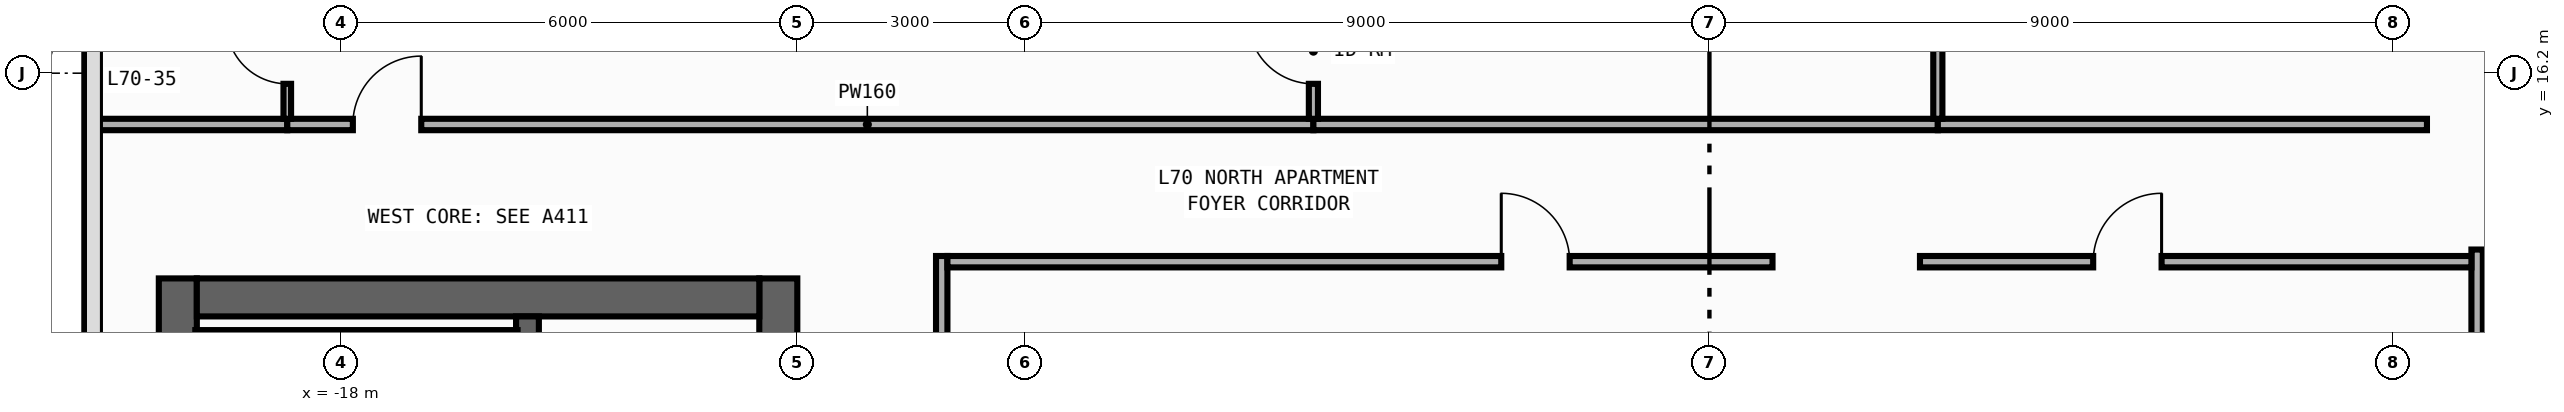
"""IFC4 building model, lengths in metres.
Left out: names, types, materials, properties, quantities, classifications, styles, units other than length and angle.
Written with IfcOpenShell. Run it as: python <this file> out.ifc"""

import sys

from ifc_helpers import new_model, si_unit, direction, frame, frame_2d, origin, place, context, subcontext, project, spatial, rectangle, extrude, element, fill, save


model = new_model("IFC4")
c1 = context("Model", 3, precision=1e-05, world=origin(), true_north=direction((0.0, 1.0)))
c2 = subcontext(c1, "Body", "Model", "MODEL_VIEW")
j1 = project(units=[si_unit("LENGTHUNIT", "METRE"), si_unit("PLANEANGLEUNIT", "RADIAN")], contexts=[c1])
p1 = place(None, origin())
s1 = spatial("IfcSite", under=j1, at=p1, CompositionType="ELEMENT")
p2 = place(p1, origin())
s2 = spatial("IfcBuilding", under=s1, at=p2, CompositionType="ELEMENT")
p3 = place(p2, frame((0.0, 0.0, 292.8)))
s3 = spatial("IfcBuildingStorey", under=s2, at=p3, CompositionType="ELEMENT", Elevation=292.8)
p4 = place(p3, frame((-20.15, -13.5, 0.0), z_axis=(0.0, 0.0, 1.0), x_axis=(0.0, 1.0, 0.0)))
e1 = element("IfcWall", 1, at=p4, inside=s3, PredefinedType="SHEAR", context=c2, shape_type="SweptSolid", body=[
    extrude(rectangle(XDim=27.0, YDim=0.5, at=frame_2d((13.5, 0.0))), origin(), (0.0, 0.0, 1.0), 3.54),
])
p5 = place(p3, frame((-12.25, -13.5, 0.0), z_axis=(0.0, 0.0, 1.0), x_axis=(0.0, 1.0, 0.0)))
e2 = element("IfcWall", 2, at=p5, inside=s3, PredefinedType="SHEAR", context=c2, shape_type="SweptSolid", body=[
    extrude(rectangle(XDim=27.0, YDim=0.5, at=frame_2d((13.5, 0.0))), origin(), (0.0, 0.0, 1.0), 3.54),
])
p6 = place(p5, frame((15.175, 0.0, 0.0)))
e3 = element("IfcOpeningElement", 3, at=p6, cuts=e2, PredefinedType="OPENING", context=c2, shape_type="SweptSolid", body=[
    extrude(rectangle(XDim=0.85, YDim=2.1, at=frame_2d((0.425, 1.05))), frame((0.0, 0.26, 0.0), z_axis=(0.0, -1.0, 0.0), x_axis=(1.0, 0.0, 0.0)), (0.0, 0.0, 1.0), 0.52),
])
p7 = place(p5, frame((21.275, 0.0, 0.0)))
e4 = element("IfcOpeningElement", 4, at=p7, cuts=e2, PredefinedType="OPENING", context=c2, shape_type="SweptSolid", body=[
    extrude(rectangle(XDim=0.85, YDim=2.1, at=frame_2d((0.425, 1.05))), frame((0.0, 0.26, 0.0), z_axis=(0.0, -1.0, 0.0), x_axis=(1.0, 0.0, 0.0)), (0.0, 0.0, 1.0), 0.52),
])
p8 = place(p5, frame((4.275, 0.0, 0.0)))
e5 = element("IfcOpeningElement", 5, at=p8, cuts=e2, PredefinedType="OPENING", context=c2, shape_type="SweptSolid", body=[
    extrude(rectangle(XDim=0.85, YDim=2.1, at=frame_2d((0.425, 1.05))), frame((0.0, 0.26, 0.0), z_axis=(0.0, -1.0, 0.0), x_axis=(1.0, 0.0, 0.0)), (0.0, 0.0, 1.0), 0.52),
])
p9 = place(p5, frame((10.275, 0.0, 0.0)))
e6 = element("IfcOpeningElement", 6, at=p9, cuts=e2, PredefinedType="OPENING", context=c2, shape_type="SweptSolid", body=[
    extrude(rectangle(XDim=0.85, YDim=2.1, at=frame_2d((0.425, 1.05))), frame((0.0, 0.26, 0.0), z_axis=(0.0, -1.0, 0.0), x_axis=(1.0, 0.0, 0.0)), (0.0, 0.0, 1.0), 0.52),
])
p10 = place(p5, frame((12.725, 0.0, 0.0)))
e7 = element("IfcOpeningElement", 7, at=p10, cuts=e2, PredefinedType="OPENING", context=c2, shape_type="SweptSolid", body=[
    extrude(rectangle(XDim=1.15, YDim=2.2, at=frame_2d((0.575, 1.1))), frame((0.0, 0.26, 0.0), z_axis=(0.0, -1.0, 0.0), x_axis=(1.0, 0.0, 0.0)), (0.0, 0.0, 1.0), 0.52),
])
p11 = place(p5, frame((1.625, 0.0, 0.0)))
e8 = element("IfcOpeningElement", 8, at=p11, cuts=e2, PredefinedType="OPENING", context=c2, shape_type="SweptSolid", body=[
    extrude(rectangle(XDim=0.85, YDim=2.1, at=frame_2d((0.425, 1.05))), frame((0.0, 0.26, 0.0), z_axis=(0.0, -1.0, 0.0), x_axis=(1.0, 0.0, 0.0)), (0.0, 0.0, 1.0), 0.52),
])
p12 = place(p3, frame((-19.9, 13.25, 0.0), z_axis=(0.0, 0.0, 1.0), x_axis=(1.0, 0.0, 0.0)))
e9 = element("IfcWall", 9, at=p12, inside=s3, PredefinedType="SHEAR", context=c2, shape_type="SweptSolid", body=[
    extrude(rectangle(XDim=7.4, YDim=0.5, at=frame_2d((3.7, 0.0))), origin(), (0.0, 0.0, 1.0), 3.54),
])
p13 = place(p3, frame((-15.55, -13.0, 0.0), z_axis=(0.0, 0.0, 1.0), x_axis=(0.0, 1.0, 0.0)))
e10 = element("IfcWall", 10, at=p13, inside=s3, PredefinedType="SHEAR", context=c2, shape_type="SweptSolid", body=[
    extrude(rectangle(XDim=26.0, YDim=0.3, at=frame_2d((13.0, 0.0))), origin(), (0.0, 0.0, 1.0), 3.54),
])
p14 = place(p13, frame((12.225, 0.0, 0.0)))
e11 = element("IfcOpeningElement", 11, at=p14, cuts=e10, PredefinedType="OPENING", context=c2, shape_type="SweptSolid", body=[
    extrude(rectangle(XDim=1.15, YDim=2.2, at=frame_2d((0.575, 1.1))), frame((0.0, 0.16, 0.0), z_axis=(0.0, -1.0, 0.0), x_axis=(1.0, 0.0, 0.0)), (0.0, 0.0, 1.0), 0.32),
])
p15 = place(p13, frame((1.125, 0.0, 0.0)))
e12 = element("IfcOpeningElement", 12, at=p15, cuts=e10, PredefinedType="OPENING", context=c2, shape_type="SweptSolid", body=[
    extrude(rectangle(XDim=0.85, YDim=2.1, at=frame_2d((0.425, 1.05))), frame((0.0, 0.16, 0.0), z_axis=(0.0, -1.0, 0.0), x_axis=(1.0, 0.0, 0.0)), (0.0, 0.0, 1.0), 0.32),
])
p16 = place(p3, frame((-19.92, 12.71, 0.0), z_axis=(0.0, 0.0, 1.0), x_axis=(1.0, 0.0, 0.0)))
e13 = element("IfcWall", 13, at=p16, inside=s3, PredefinedType="SHEAR", context=c2, shape_type="SweptSolid", body=[
    extrude(rectangle(XDim=4.24, YDim=0.22, at=frame_2d((2.12, 0.0))), origin(), (0.0, 0.0, 1.0), 3.54),
])
p17 = place(p3, frame((-10.1, 2.39, 0.0), z_axis=(0.0, 0.0, 1.0), x_axis=(0.0, 1.0, 0.0)))
e14 = element("IfcWall", 14, at=p17, inside=s3, PredefinedType="PARTITIONING", context=c2, shape_type="SweptSolid", body=[
    extrude(rectangle(XDim=11.405, YDim=0.15, at=frame_2d((5.703, 0.0))), origin(), (0.0, 0.0, 1.0), 3.54),
])
p18 = place(p17, frame((2.5, 0.0, 0.0)))
e15 = element("IfcOpeningElement", 15, at=p18, cuts=e14, PredefinedType="OPENING", context=c2, shape_type="SweptSolid", body=[
    extrude(rectangle(XDim=0.9, YDim=2.15, at=frame_2d((0.45, 1.075))), frame((0.0, 0.085, 0.0), z_axis=(0.0, -1.0, 0.0), x_axis=(1.0, 0.0, 0.0)), (0.0, 0.0, 1.0), 0.17),
])
p19 = place(p3, frame((10.1, 2.39, 0.0), z_axis=(0.0, 0.0, 1.0), x_axis=(0.0, 1.0, 0.0)))
e16 = element("IfcWall", 16, at=p19, inside=s3, PredefinedType="PARTITIONING", context=c2, shape_type="SweptSolid", body=[
    extrude(rectangle(XDim=11.49, YDim=0.15, at=frame_2d((5.745, 0.0))), origin(), (0.0, 0.0, 1.0), 3.54),
])
p20 = place(p19, frame((2.475, 0.0, 0.0)))
e17 = element("IfcOpeningElement", 17, at=p20, cuts=e16, PredefinedType="OPENING", context=c2, shape_type="SweptSolid", body=[
    extrude(rectangle(XDim=0.9, YDim=2.15, at=frame_2d((0.45, 1.075))), frame((0.0, 0.085, 0.0), z_axis=(0.0, -1.0, 0.0), x_axis=(1.0, 0.0, 0.0)), (0.0, 0.0, 1.0), 0.17),
])
p21 = place(p3, frame((-21.255, 15.525, 0.0), z_axis=(0.0, 0.0, 1.0), x_axis=(1.0, 0.0, 0.0)))
e18 = element("IfcWall", 18, at=p21, inside=s3, PredefinedType="PARTITIONING", context=c2, shape_type="SweptSolid", body=[
    extrude(rectangle(XDim=2.545, YDim=0.15, at=frame_2d((1.272, 0.0))), origin(), (0.0, 0.0, 1.0), 3.54),
])
p22 = place(p3, frame((-18.71, 15.525, 0.0), z_axis=(0.0, 0.0, 1.0), x_axis=(1.0, 0.0, 0.0)))
e19 = element("IfcWall", 19, at=p22, inside=s3, PredefinedType="PARTITIONING", context=c2, shape_type="SweptSolid", body=[
    extrude(rectangle(XDim=13.5, YDim=0.15, at=frame_2d((6.75, 0.0))), origin(), (0.0, 0.0, 1.0), 3.54),
])
p23 = place(p22, frame((0.863, 0.0, 0.0)))
e20 = element("IfcOpeningElement", 20, at=p23, cuts=e19, PredefinedType="OPENING", context=c2, shape_type="SweptSolid", body=[
    extrude(rectangle(XDim=0.9, YDim=2.15, at=frame_2d((0.45, 1.075))), frame((0.0, 0.085, 0.0), z_axis=(0.0, -1.0, 0.0), x_axis=(1.0, 0.0, 0.0)), (0.0, 0.0, 1.0), 0.17),
])
p24 = place(p3, frame((-5.21, 15.525, 0.0), z_axis=(0.0, 0.0, 1.0), x_axis=(1.0, 0.0, 0.0)))
e21 = element("IfcWall", 21, at=p24, inside=s3, PredefinedType="PARTITIONING", context=c2, shape_type="SweptSolid", body=[
    extrude(rectangle(XDim=8.215, YDim=0.15, at=frame_2d((4.107, 0.0))), origin(), (0.0, 0.0, 1.0), 3.54),
])
p25 = place(p3, frame((3.005, 15.525, 0.0), z_axis=(0.0, 0.0, 1.0), x_axis=(1.0, 0.0, 0.0)))
e22 = element("IfcWall", 22, at=p25, inside=s3, PredefinedType="PARTITIONING", context=c2, shape_type="SweptSolid", body=[
    extrude(rectangle(XDim=6.435, YDim=0.15, at=frame_2d((3.218, 0.0))), origin(), (0.0, 0.0, 1.0), 3.54),
])
p26 = place(p3, frame((-10.025, 13.72, 0.0), z_axis=(0.0, 0.0, 1.0), x_axis=(1.0, 0.0, 0.0)))
e23 = element("IfcWall", 23, at=p26, inside=s3, PredefinedType="PARTITIONING", context=c2, shape_type="SweptSolid", body=[
    extrude(rectangle(XDim=10.855, YDim=0.15, at=frame_2d((5.427, 0.0))), origin(), (0.0, 0.0, 1.0), 3.54),
])
p27 = place(p26, frame((7.286, 0.0, 0.0)))
e24 = element("IfcOpeningElement", 24, at=p27, cuts=e23, PredefinedType="OPENING", context=c2, shape_type="SweptSolid", body=[
    extrude(rectangle(XDim=0.9, YDim=2.15, at=frame_2d((0.45, 1.075))), frame((0.0, 0.085, 0.0), z_axis=(0.0, -1.0, 0.0), x_axis=(1.0, 0.0, 0.0)), (0.0, 0.0, 1.0), 0.17),
])
p28 = place(p3, frame((2.77, 13.72, 0.0), z_axis=(0.0, 0.0, 1.0), x_axis=(1.0, 0.0, 0.0)))
e25 = element("IfcWall", 25, at=p28, inside=s3, PredefinedType="PARTITIONING", context=c2, shape_type="SweptSolid", body=[
    extrude(rectangle(XDim=7.255, YDim=0.15, at=frame_2d((3.627, 0.0))), origin(), (0.0, 0.0, 1.0), 3.54),
])
p29 = place(p28, frame((2.279, 0.0, 0.0)))
e26 = element("IfcOpeningElement", 26, at=p29, cuts=e25, PredefinedType="OPENING", context=c2, shape_type="SweptSolid", body=[
    extrude(rectangle(XDim=0.9, YDim=2.15, at=frame_2d((0.45, 1.075))), frame((0.0, 0.085, 0.0), z_axis=(0.0, -1.0, 0.0), x_axis=(1.0, 0.0, 0.0)), (0.0, 0.0, 1.0), 0.17),
])
p30 = place(p3, frame((-18.71, 15.6, 0.0), z_axis=(0.0, 0.0, 1.0), x_axis=(0.0, 1.0, 0.0)))
e27 = element("IfcWall", 27, at=p30, inside=s3, PredefinedType="PARTITIONING", context=c2, shape_type="SweptSolid", body=[
    extrude(rectangle(XDim=2.5, YDim=0.1, at=frame_2d((1.25, 0.0))), origin(), (0.0, 0.0, 1.0), 3.54),
])
p31 = place(p30, frame((0.46, 0.0, 0.0)))
e28 = element("IfcOpeningElement", 28, at=p31, cuts=e27, PredefinedType="OPENING", context=c2, shape_type="SweptSolid", body=[
    extrude(rectangle(XDim=0.8, YDim=2.1, at=frame_2d((0.4, 1.05))), frame((0.0, 0.06, 0.0), z_axis=(0.0, -1.0, 0.0), x_axis=(1.0, 0.0, 0.0)), (0.0, 0.0, 1.0), 0.12),
])
p32 = place(p3, frame((-5.21, 15.6, 0.0), z_axis=(0.0, 0.0, 1.0), x_axis=(0.0, 1.0, 0.0)))
e29 = element("IfcWall", 29, at=p32, inside=s3, PredefinedType="PARTITIONING", context=c2, shape_type="SweptSolid", body=[
    extrude(rectangle(XDim=4.5, YDim=0.12, at=frame_2d((2.25, 0.0))), origin(), (0.0, 0.0, 1.0), 3.54),
])
p33 = place(p32, frame((0.46, 0.0, 0.0)))
e30 = element("IfcOpeningElement", 30, at=p33, cuts=e29, PredefinedType="OPENING", context=c2, shape_type="SweptSolid", body=[
    extrude(rectangle(XDim=0.86, YDim=2.15, at=frame_2d((0.43, 1.075))), frame((0.0, 0.07, 0.0), z_axis=(0.0, -1.0, 0.0), x_axis=(1.0, 0.0, 0.0)), (0.0, 0.0, 1.0), 0.14),
])
p34 = place(p3, frame((3.005, 15.6, 0.0), z_axis=(0.0, 0.0, 1.0), x_axis=(0.0, 1.0, 0.0)))
e31 = element("IfcWall", 31, at=p34, inside=s3, PredefinedType="PARTITIONING", context=c2, shape_type="SweptSolid", body=[
    extrude(rectangle(XDim=8.455, YDim=0.12, at=frame_2d((4.228, 0.0))), origin(), (0.0, 0.0, 1.0), 3.54),
])
p35 = place(p34, frame((7.195, 0.0, 0.0)))
e32 = element("IfcOpeningElement", 32, at=p35, cuts=e31, PredefinedType="OPENING", context=c2, shape_type="SweptSolid", body=[
    extrude(rectangle(XDim=0.8, YDim=2.1, at=frame_2d((0.4, 1.05))), frame((0.0, 0.07, 0.0), z_axis=(0.0, -1.0, 0.0), x_axis=(1.0, 0.0, 0.0)), (0.0, 0.0, 1.0), 0.14),
])
p36 = place(p23, origin())
e33 = element("IfcDoor", 33, at=p36, inside=s3, OperationType="SINGLE_SWING_RIGHT", PredefinedType="DOOR", context=c2, shape_type="SweptSolid", body=[
    extrude(rectangle(XDim=0.9, YDim=2.15, at=frame_2d((0.45, 1.075))), frame((0.0, 0.025, 0.0), z_axis=(0.0, -1.0, 0.0), x_axis=(1.0, 0.0, 0.0)), (0.0, 0.0, 1.0), 0.05),
])
fill(e20, e33)
p37 = place(p27, origin())
e34 = element("IfcDoor", 34, at=p37, inside=s3, OperationType="SINGLE_SWING_LEFT", PredefinedType="DOOR", context=c2, shape_type="SweptSolid", body=[
    extrude(rectangle(XDim=0.9, YDim=2.15, at=frame_2d((0.45, 1.075))), frame((0.0, 0.025, 0.0), z_axis=(0.0, -1.0, 0.0), x_axis=(1.0, 0.0, 0.0)), (0.0, 0.0, 1.0), 0.05),
])
fill(e24, e34)
p38 = place(p29, origin())
e35 = element("IfcDoor", 35, at=p38, inside=s3, OperationType="SINGLE_SWING_RIGHT", PredefinedType="DOOR", context=c2, shape_type="SweptSolid", body=[
    extrude(rectangle(XDim=0.9, YDim=2.15, at=frame_2d((0.45, 1.075))), frame((0.0, 0.025, 0.0), z_axis=(0.0, -1.0, 0.0), x_axis=(1.0, 0.0, 0.0)), (0.0, 0.0, 1.0), 0.05),
])
fill(e26, e35)
p39 = place(p31, origin())
e36 = element("IfcDoor", 36, at=p39, inside=s3, OperationType="SINGLE_SWING_RIGHT", PredefinedType="DOOR", context=c2, shape_type="SweptSolid", body=[
    extrude(rectangle(XDim=0.8, YDim=2.1, at=frame_2d((0.4, 1.05))), frame((0.0, 0.025, 0.0), z_axis=(0.0, -1.0, 0.0), x_axis=(1.0, 0.0, 0.0)), (0.0, 0.0, 1.0), 0.05),
])
fill(e28, e36)
p40 = place(p33, origin())
e37 = element("IfcDoor", 37, at=p40, inside=s3, OperationType="SINGLE_SWING_RIGHT", PredefinedType="DOOR", context=c2, shape_type="SweptSolid", body=[
    extrude(rectangle(XDim=0.86, YDim=2.15, at=frame_2d((0.43, 1.075))), frame((0.0, 0.025, 0.0), z_axis=(0.0, -1.0, 0.0), x_axis=(1.0, 0.0, 0.0)), (0.0, 0.0, 1.0), 0.05),
])
fill(e30, e37)
save(model, sys.argv[1])
